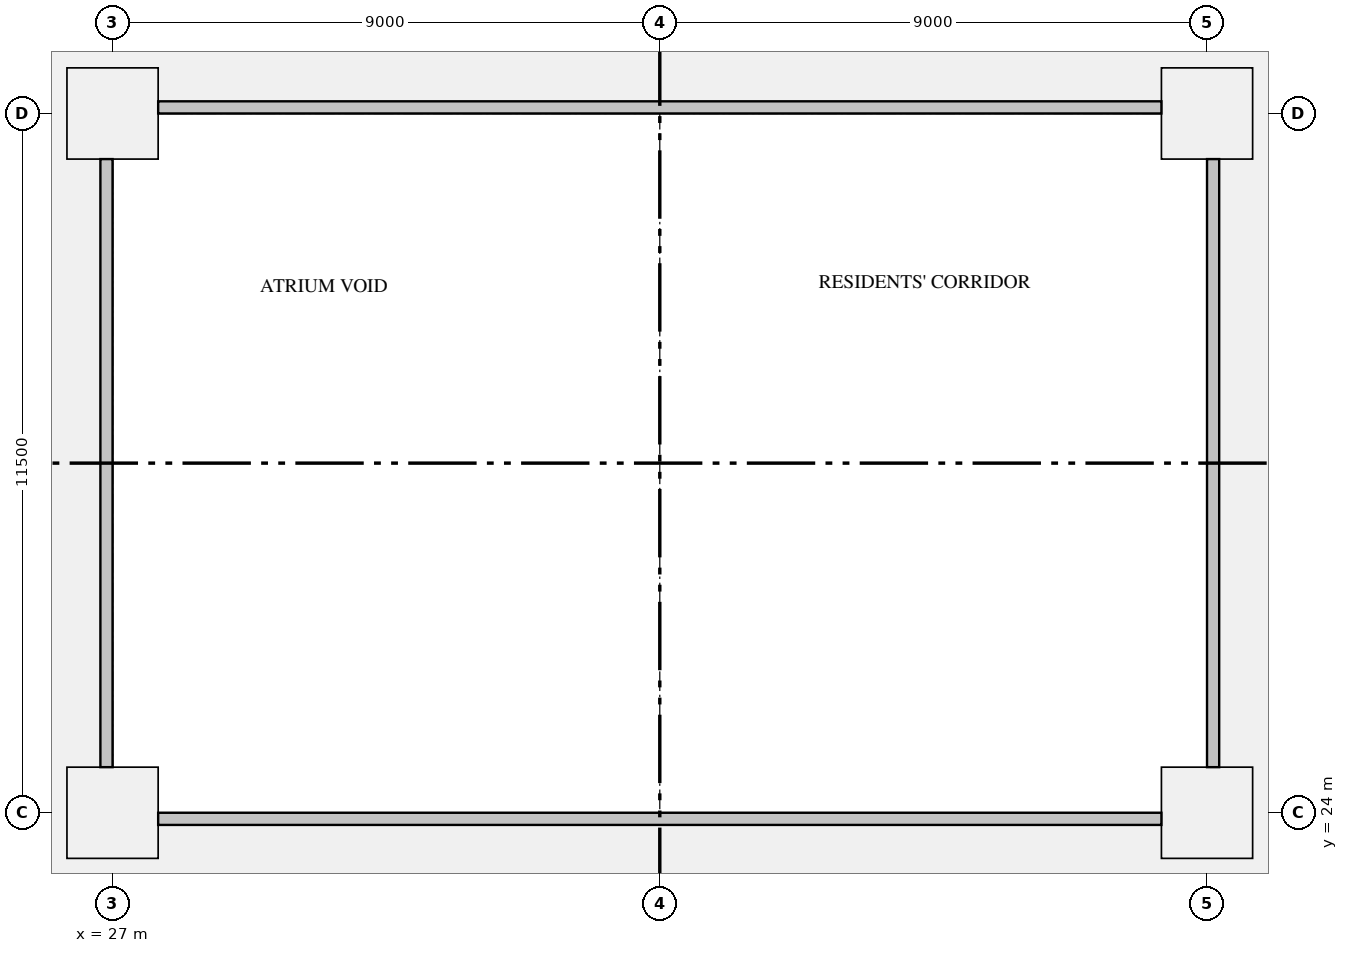
"""IFC4 building model, lengths in metres.
Left out: names, types, materials, properties, quantities, classifications, styles, units other than length and angle.
Written with IfcOpenShell. Run it as: python <this file> out.ifc"""

import sys

from ifc_helpers import new_model, si_unit, direction, frame, origin, origin_2d, place, context, subcontext, project, spatial, rectangle, extrude, element, save


model = new_model("IFC4")
c1 = context("Model", 3, precision=1e-05, world=origin(), true_north=direction((0.0, 1.0)))
c2 = subcontext(c1, "Body", "Model", "MODEL_VIEW")
j1 = project(units=[si_unit("LENGTHUNIT", "METRE"), si_unit("PLANEANGLEUNIT", "RADIAN")], contexts=[c1])
p1 = place(None, origin())
s1 = spatial("IfcSite", under=j1, at=p1, CompositionType="ELEMENT")
p2 = place(p1, origin())
s2 = spatial("IfcBuilding", under=s1, at=p2, CompositionType="ELEMENT")
p3 = place(p2, frame((0.0, 0.0, 38.4)))
s3 = spatial("IfcBuildingStorey", under=s2, at=p3, CompositionType="ELEMENT", Elevation=38.4)
for number, where, z_axis, x_axis in (
    (1, (27.0, 24.0, 0.0), (0.0, 0.0, 1.0), (1.0, 0.0, 0.0)),
    (2, (45.0, 24.0, 0.0), (0.0, 0.0, 1.0), (1.0, 0.0, 0.0)),
    (3, (27.0, 35.5, 0.0), (0.0, 0.0, 1.0), (1.0, 0.0, 0.0)),
    (4, (45.0, 35.5, 0.0), (0.0, 0.0, 1.0), (1.0, 0.0, 0.0)),
):
    element("IfcColumn", number, at=place(p3, frame(where, z_axis=z_axis, x_axis=x_axis)), inside=s3, PredefinedType="COLUMN", context=c2, shape_type="SweptSolid", body=[
        extrude(rectangle(XDim=1.5, YDim=1.5, at=origin_2d()), origin(), (0.0, 0.0, 1.0), 3.15),
    ])
save(model, sys.argv[1])
